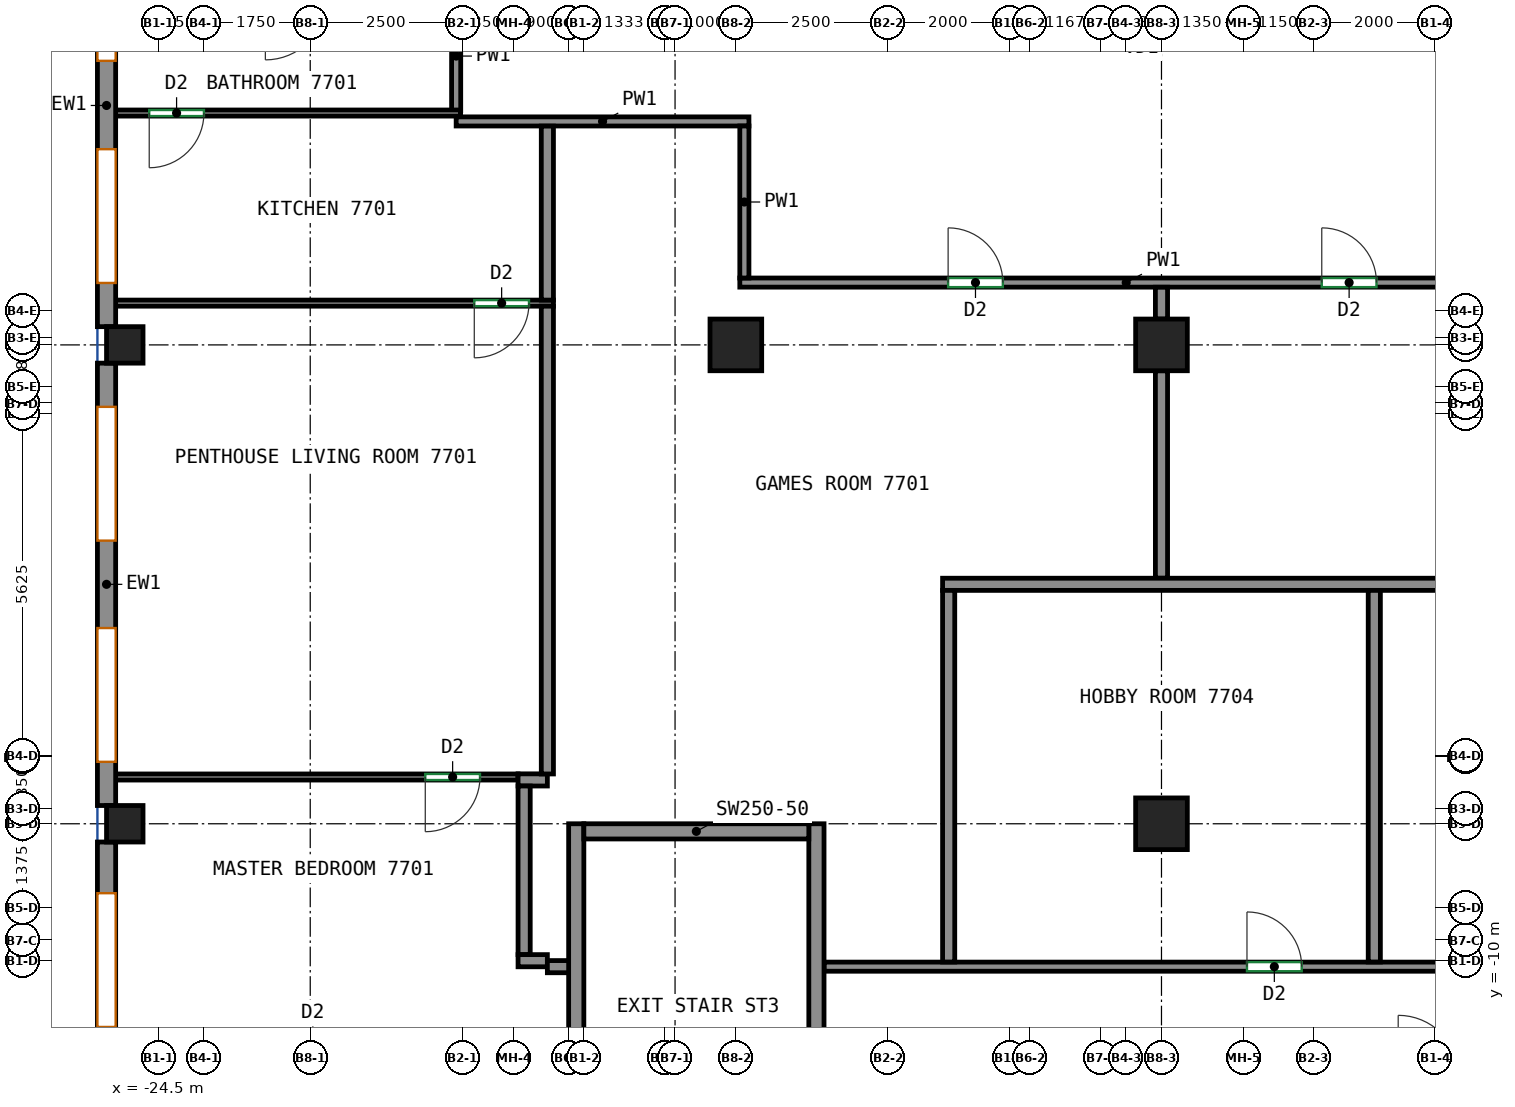
"""IFC4 building model, lengths in metres.
Left out: names, types, materials, properties, quantities, classifications, styles, units other than length and angle.
Written with IfcOpenShell. Run it as: python <this file> out.ifc"""

import sys

from ifc_helpers import new_model, si_unit, direction, frame, frame_2d, origin, origin_2d, place, context, subcontext, project, spatial, rectangle, extrude, source, transform, mapped, element, fill, save


model = new_model("IFC4")
c1 = context("Model", 3, precision=1e-05, world=origin(), true_north=direction((0.0, 1.0)))
c2 = subcontext(c1, "Body", "Model", "MODEL_VIEW")
j1 = project(units=[si_unit("LENGTHUNIT", "METRE"), si_unit("PLANEANGLEUNIT", "RADIAN")], contexts=[c1])
p1 = place(None, origin())
s1 = spatial("IfcSite", under=j1, at=p1, CompositionType="ELEMENT")
p2 = place(p1, origin())
s2 = spatial("IfcBuilding", under=s1, at=p2, CompositionType="ELEMENT")
p3 = place(p2, frame((0.0, 0.0, 308.6)))
s3 = spatial("IfcBuildingStorey", under=s2, at=p3, CompositionType="ELEMENT", Elevation=308.6)
m1 = source(origin(), c2, "Body", "SweptSolid", [
    extrude(rectangle(XDim=0.6, YDim=0.6, at=origin_2d()), origin(), (0.0, 0.0, 1.0), 3.12),
])
for number, where, z_axis, x_axis in (
    (1, (-25.05, -7.75, 0.0), (0.0, 0.0, 1.0), (1.0, 0.0, 0.0)),
    (2, (-25.05, 0.125, 0.0), (0.0, 0.0, 1.0), (1.0, 0.0, 0.0)),
):
    element("IfcColumn", number, at=place(p3, frame(where, z_axis=z_axis, x_axis=x_axis)), inside=s3, PredefinedType="COLUMN", context=c2, shape_type="MappedRepresentation", body=[
        mapped(m1, transform((0.0, 0.0, 0.0))),
    ])
m2 = source(origin(), c2, "Body", "SweptSolid", [
    extrude(rectangle(XDim=0.85, YDim=0.85, at=origin_2d()), origin(), (0.0, 0.0, 1.0), 3.12),
])
for number, where, z_axis, x_axis in (
    (3, (-15.0, 0.125, 0.0), (0.0, 0.0, 1.0), (1.0, 0.0, 0.0)),
    (4, (-8.0, -7.75, 0.0), (0.0, 0.0, 1.0), (1.0, 0.0, 0.0)),
    (5, (-8.0, 0.125, 0.0), (0.0, 0.0, 1.0), (1.0, 0.0, 0.0)),
):
    element("IfcColumn", number, at=place(p3, frame(where, z_axis=z_axis, x_axis=x_axis)), inside=s3, PredefinedType="COLUMN", context=c2, shape_type="MappedRepresentation", body=[
        mapped(m2, transform((0.0, 0.0, 0.0))),
    ])
m3 = source(origin(), c2, "Body", "SweptSolid", [
    extrude(rectangle(XDim=8.0, YDim=0.25, at=frame_2d((4.0, 0.0))), origin(), (0.0, 0.0, 1.0), 3.12),
])
for number, where, z_axis, x_axis in (
    (6, (-17.625, -15.75, 0.0), (0.0, 0.0, 1.0), (0.0, 1.0, 0.0)),
    (7, (-13.675, -15.75, 0.0), (0.0, 0.0, 1.0), (0.0, 1.0, 0.0)),
):
    element("IfcWall", number, at=place(p3, frame(where, z_axis=z_axis, x_axis=x_axis)), inside=s3, PredefinedType="SHEAR", context=c2, shape_type="MappedRepresentation", body=[
        mapped(m3, transform((0.0, 0.0, 0.0))),
    ])
m4 = source(origin(), c2, "Body", "SweptSolid", [
    extrude(rectangle(XDim=3.7, YDim=0.25, at=frame_2d((1.85, 0.0))), origin(), (0.0, 0.0, 1.0), 3.12),
])
p4 = place(p3, frame((-17.5, -7.875, 0.0), z_axis=(0.0, 0.0, 1.0), x_axis=(1.0, 0.0, 0.0)))
e8 = element("IfcWall", 8, at=p4, inside=s3, PredefinedType="SHEAR", context=c2, shape_type="MappedRepresentation", body=[
    mapped(m4, transform((0.0, 0.0, 0.0))),
])
m5 = source(origin(), c2, "Body", "SweptSolid", [
    extrude(rectangle(XDim=7.275, YDim=0.3, at=frame_2d((3.637, 0.0))), origin(), (0.0, 0.0, 1.0), 3.12),
])
p5 = place(p3, frame((-25.35, 7.7, 0.0), z_axis=(0.0, 0.0, 1.0), x_axis=(0.0, -1.0, 0.0)))
e9 = element("IfcWall", 9, at=p5, inside=s3, PredefinedType="SOLIDWALL", context=c2, shape_type="MappedRepresentation", body=[
    mapped(m5, transform((0.0, 0.0, 0.0))),
])
p6 = place(p5, frame((0.728, 0.0, 0.8)))
e10 = element("IfcOpeningElement", 10, at=p6, cuts=e9, PredefinedType="OPENING", context=c2, shape_type="SweptSolid", body=[
    extrude(rectangle(XDim=1.0, YDim=2.05, at=frame_2d((0.5, 1.025))), frame((0.0, 0.16, 0.0), z_axis=(0.0, -1.0, 0.0), x_axis=(1.0, 0.0, 0.0)), (0.0, 0.0, 1.0), 0.32),
])
p7 = place(p5, frame((4.356, 0.0, 0.8)))
e11 = element("IfcOpeningElement", 11, at=p7, cuts=e9, PredefinedType="OPENING", context=c2, shape_type="SweptSolid", body=[
    extrude(rectangle(XDim=2.2, YDim=2.05, at=frame_2d((1.1, 1.025))), frame((0.0, 0.16, 0.0), z_axis=(0.0, -1.0, 0.0), x_axis=(1.0, 0.0, 0.0)), (0.0, 0.0, 1.0), 0.32),
])
p8 = place(p5, frame((2.053, 0.0, 0.8)))
e12 = element("IfcOpeningElement", 12, at=p8, cuts=e9, PredefinedType="OPENING", context=c2, shape_type="SweptSolid", body=[
    extrude(rectangle(XDim=0.85, YDim=2.05, at=frame_2d((0.425, 1.025))), frame((0.0, 0.16, 0.0), z_axis=(0.0, -1.0, 0.0), x_axis=(1.0, 0.0, 0.0)), (0.0, 0.0, 1.0), 0.32),
])
p9 = place(p3, frame((-25.35, -0.175, 0.0), z_axis=(0.0, 0.0, 1.0), x_axis=(0.0, -1.0, 0.0)))
e13 = element("IfcWall", 13, at=p9, inside=s3, PredefinedType="SOLIDWALL", context=c2, shape_type="MappedRepresentation", body=[
    mapped(m5, transform((0.0, 0.0, 0.0))),
])
p10 = place(p9, frame((0.719, 0.0, 0.8)))
e14 = element("IfcOpeningElement", 14, at=p10, cuts=e13, PredefinedType="OPENING", context=c2, shape_type="SweptSolid", body=[
    extrude(rectangle(XDim=2.2, YDim=2.05, at=frame_2d((1.1, 1.025))), frame((0.0, 0.16, 0.0), z_axis=(0.0, -1.0, 0.0), x_axis=(1.0, 0.0, 0.0)), (0.0, 0.0, 1.0), 0.32),
])
p11 = place(p9, frame((4.356, 0.0, 0.8)))
e15 = element("IfcOpeningElement", 15, at=p11, cuts=e13, PredefinedType="OPENING", context=c2, shape_type="SweptSolid", body=[
    extrude(rectangle(XDim=2.2, YDim=2.05, at=frame_2d((1.1, 1.025))), frame((0.0, 0.16, 0.0), z_axis=(0.0, -1.0, 0.0), x_axis=(1.0, 0.0, 0.0)), (0.0, 0.0, 1.0), 0.32),
])
m6 = source(origin(), c2, "Body", "SweptSolid", [
    extrude(rectangle(XDim=11.65, YDim=0.3, at=frame_2d((5.825, 0.0))), origin(), (0.0, 0.0, 1.0), 3.12),
])
p12 = place(p3, frame((-25.35, -8.05, 0.0), z_axis=(0.0, 0.0, 1.0), x_axis=(0.0, -1.0, 0.0)))
e16 = element("IfcWall", 16, at=p12, inside=s3, PredefinedType="SOLIDWALL", context=c2, shape_type="MappedRepresentation", body=[
    mapped(m6, transform((0.0, 0.0, 0.0))),
])
p13 = place(p12, frame((0.842, 0.0, 0.8)))
e17 = element("IfcOpeningElement", 17, at=p13, cuts=e16, PredefinedType="OPENING", context=c2, shape_type="SweptSolid", body=[
    extrude(rectangle(XDim=2.2, YDim=2.05, at=frame_2d((1.1, 1.025))), frame((0.0, 0.16, 0.0), z_axis=(0.0, -1.0, 0.0), x_axis=(1.0, 0.0, 0.0)), (0.0, 0.0, 1.0), 0.32),
])
p14 = place(p12, frame((4.725, 0.0, 0.8)))
e18 = element("IfcOpeningElement", 18, at=p14, cuts=e16, PredefinedType="OPENING", context=c2, shape_type="SweptSolid", body=[
    extrude(rectangle(XDim=2.2, YDim=2.05, at=frame_2d((1.1, 1.025))), frame((0.0, 0.16, 0.0), z_axis=(0.0, -1.0, 0.0), x_axis=(1.0, 0.0, 0.0)), (0.0, 0.0, 1.0), 0.32),
])
p15 = place(p12, frame((8.608, 0.0, 0.8)))
e19 = element("IfcOpeningElement", 19, at=p15, cuts=e16, PredefinedType="OPENING", context=c2, shape_type="SweptSolid", body=[
    extrude(rectangle(XDim=2.2, YDim=2.05, at=frame_2d((1.1, 1.025))), frame((0.0, 0.16, 0.0), z_axis=(0.0, -1.0, 0.0), x_axis=(1.0, 0.0, 0.0)), (0.0, 0.0, 1.0), 0.32),
])
p16 = place(p3, frame((-19.6, 3.8, 0.0), z_axis=(0.0, 0.0, 1.0), x_axis=(1.0, 0.0, 0.0)))
e20 = element("IfcWall", 20, at=p16, inside=s3, PredefinedType="PARTITIONING", context=c2, shape_type="SweptSolid", body=[
    extrude(rectangle(XDim=4.815, YDim=0.15, at=frame_2d((2.408, 0.0))), origin(), (0.0, 0.0, 1.0), 3.12),
])
p17 = place(p3, frame((-19.6, 3.978, 0.0), z_axis=(0.0, 0.0, 1.0), x_axis=(0.0, 1.0, 0.0)))
e21 = element("IfcWall", 21, at=p17, inside=s3, PredefinedType="PARTITIONING", context=c2, shape_type="SweptSolid", body=[
    extrude(rectangle(XDim=1.794, YDim=0.15, at=frame_2d((0.897, 0.0))), origin(), (0.0, 0.0, 1.0), 3.12),
])
p18 = place(p3, frame((-14.935, 1.15, 0.0), z_axis=(0.0, 0.0, 1.0), x_axis=(1.0, 0.0, 0.0)))
e22 = element("IfcWall", 22, at=p18, inside=s3, PredefinedType="PARTITIONING", context=c2, shape_type="SweptSolid", body=[
    extrude(rectangle(XDim=12.71, YDim=0.15, at=frame_2d((6.355, 0.0))), origin(), (0.0, 0.0, 1.0), 3.12),
])
p19 = place(p18, frame((3.426, 0.0, 0.0)))
e23 = element("IfcOpeningElement", 23, at=p19, cuts=e22, PredefinedType="OPENING", context=c2, shape_type="SweptSolid", body=[
    extrude(rectangle(XDim=0.9, YDim=2.1, at=frame_2d((0.45, 1.05))), frame((0.0, 0.085, 0.0), z_axis=(0.0, -1.0, 0.0), x_axis=(1.0, 0.0, 0.0)), (0.0, 0.0, 1.0), 0.17),
])
p20 = place(p18, frame((9.571, 0.0, 0.0)))
e24 = element("IfcOpeningElement", 24, at=p20, cuts=e22, PredefinedType="OPENING", context=c2, shape_type="SweptSolid", body=[
    extrude(rectangle(XDim=0.9, YDim=2.1, at=frame_2d((0.45, 1.05))), frame((0.0, 0.085, 0.0), z_axis=(0.0, -1.0, 0.0), x_axis=(1.0, 0.0, 0.0)), (0.0, 0.0, 1.0), 0.17),
])
p21 = place(p3, frame((-14.86, 3.725, 0.0), z_axis=(0.0, 0.0, 1.0), x_axis=(0.0, -1.0, 0.0)))
e25 = element("IfcWall", 25, at=p21, inside=s3, PredefinedType="PARTITIONING", context=c2, shape_type="SweptSolid", body=[
    extrude(rectangle(XDim=2.5, YDim=0.15, at=frame_2d((1.25, 0.0))), origin(), (0.0, 0.0, 1.0), 3.12),
])
p22 = place(p3, frame((-13.55, -10.1, 0.0), z_axis=(0.0, 0.0, 1.0), x_axis=(1.0, 0.0, 0.0)))
e26 = element("IfcWall", 26, at=p22, inside=s3, PredefinedType="PARTITIONING", context=c2, shape_type="SweptSolid", body=[
    extrude(rectangle(XDim=30.65, YDim=0.15, at=frame_2d((15.325, 0.0))), origin(), (0.0, 0.0, 1.0), 3.12),
])
p23 = place(p22, frame((6.956, 0.0, 0.0)))
e27 = element("IfcOpeningElement", 27, at=p23, cuts=e26, PredefinedType="OPENING", context=c2, shape_type="SweptSolid", body=[
    extrude(rectangle(XDim=0.9, YDim=2.1, at=frame_2d((0.45, 1.05))), frame((0.0, 0.085, 0.0), z_axis=(0.0, -1.0, 0.0), x_axis=(1.0, 0.0, 0.0)), (0.0, 0.0, 1.0), 0.17),
])
p24 = place(p22, frame((10.643, 0.0, 0.0)))
e28 = element("IfcOpeningElement", 28, at=p24, cuts=e26, PredefinedType="OPENING", context=c2, shape_type="SweptSolid", body=[
    extrude(rectangle(XDim=0.9, YDim=2.1, at=frame_2d((0.45, 1.05))), frame((0.0, 0.085, 0.0), z_axis=(0.0, -1.0, 0.0), x_axis=(1.0, 0.0, 0.0)), (0.0, 0.0, 1.0), 0.17),
])
p25 = place(p22, frame((24.155, 0.0, 0.0)))
e29 = element("IfcOpeningElement", 29, at=p25, cuts=e26, PredefinedType="OPENING", context=c2, shape_type="SweptSolid", body=[
    extrude(rectangle(XDim=0.9, YDim=2.1, at=frame_2d((0.45, 1.05))), frame((0.0, 0.085, 0.0), z_axis=(0.0, -1.0, 0.0), x_axis=(1.0, 0.0, 0.0)), (0.0, 0.0, 1.0), 0.17),
])
p26 = place(p3, frame((-18.582, -6.981, 0.0), z_axis=(0.0, 0.0, 1.0), x_axis=(-1.0, 0.0, 0.0)))
e30 = element("IfcWall", 30, at=p26, inside=s3, PredefinedType="PARTITIONING", context=c2, shape_type="SweptSolid", body=[
    extrude(rectangle(XDim=6.668, YDim=0.1, at=frame_2d((3.334, 0.0))), origin(), (0.0, 0.0, 1.0), 3.12),
])
p27 = place(p26, frame((0.626, 0.0, 0.0)))
e31 = element("IfcOpeningElement", 31, at=p27, cuts=e30, PredefinedType="OPENING", context=c2, shape_type="SweptSolid", body=[
    extrude(rectangle(XDim=0.9, YDim=2.1, at=frame_2d((0.45, 1.05))), frame((0.0, 0.06, 0.0), z_axis=(0.0, -1.0, 0.0), x_axis=(1.0, 0.0, 0.0)), (0.0, 0.0, 1.0), 0.12),
])
p28 = place(p3, frame((-18.582, -7.029, 0.0), z_axis=(0.0, 0.0, 1.0), x_axis=(1.0, 0.0, 0.0)))
e32 = element("IfcWall", 32, at=p28, inside=s3, PredefinedType="PARTITIONING", context=c2, shape_type="SweptSolid", body=[
    extrude(rectangle(XDim=0.482, YDim=0.2, at=frame_2d((0.241, 0.0))), origin(), (0.0, 0.0, 1.0), 3.12),
])
p29 = place(p3, frame((-18.482, -9.902, 0.0), z_axis=(0.0, 0.0, 1.0), x_axis=(0.0, 1.0, 0.0)))
e33 = element("IfcWall", 33, at=p29, inside=s3, PredefinedType="PARTITIONING", context=c2, shape_type="SweptSolid", body=[
    extrude(rectangle(XDim=2.773, YDim=0.2, at=frame_2d((1.387, 0.0))), origin(), (0.0, 0.0, 1.0), 3.12),
])
p30 = place(p3, frame((-18.1, -10.002, 0.0), z_axis=(0.0, 0.0, 1.0), x_axis=(-1.0, 0.0, 0.0)))
e34 = element("IfcWall", 34, at=p30, inside=s3, PredefinedType="PARTITIONING", context=c2, shape_type="SweptSolid", body=[
    extrude(rectangle(XDim=0.482, YDim=0.2, at=frame_2d((0.241, 0.0))), origin(), (0.0, 0.0, 1.0), 3.12),
])
p31 = place(p3, frame((-17.7, -10.1, 0.0), z_axis=(0.0, 0.0, 1.0), x_axis=(-1.0, 0.0, 0.0)))
e35 = element("IfcWall", 35, at=p31, inside=s3, PredefinedType="PARTITIONING", context=c2, shape_type="SweptSolid", body=[
    extrude(rectangle(XDim=0.4, YDim=0.2, at=frame_2d((0.2, 0.0))), origin(), (0.0, 0.0, 1.0), 3.12),
])
p32 = place(p3, frame((-18.0, 0.812, 0.0), z_axis=(0.0, 0.0, 1.0), x_axis=(-1.0, 0.0, 0.0)))
e36 = element("IfcWall", 36, at=p32, inside=s3, PredefinedType="PARTITIONING", context=c2, shape_type="SweptSolid", body=[
    extrude(rectangle(XDim=7.25, YDim=0.1, at=frame_2d((3.625, 0.0))), origin(), (0.0, 0.0, 1.0), 3.12),
])
p33 = place(p32, frame((0.402, 0.0, 0.0)))
e37 = element("IfcOpeningElement", 37, at=p33, cuts=e36, PredefinedType="OPENING", context=c2, shape_type="SweptSolid", body=[
    extrude(rectangle(XDim=0.9, YDim=2.1, at=frame_2d((0.45, 1.05))), frame((0.0, 0.06, 0.0), z_axis=(0.0, -1.0, 0.0), x_axis=(1.0, 0.0, 0.0)), (0.0, 0.0, 1.0), 0.12),
])
p34 = place(p3, frame((-18.1, -6.931, 0.0), z_axis=(0.0, 0.0, 1.0), x_axis=(0.0, 1.0, 0.0)))
e38 = element("IfcWall", 38, at=p34, inside=s3, PredefinedType="PARTITIONING", context=c2, shape_type="SweptSolid", body=[
    extrude(rectangle(XDim=7.693, YDim=0.2, at=frame_2d((3.846, 0.0))), origin(), (0.0, 0.0, 1.0), 3.12),
])
p35 = place(p3, frame((-19.527, 3.938, 0.0), z_axis=(0.0, 0.0, 1.0), x_axis=(-1.0, 0.0, 0.0)))
e39 = element("IfcWall", 39, at=p35, inside=s3, PredefinedType="PARTITIONING", context=c2, shape_type="SweptSolid", body=[
    extrude(rectangle(XDim=5.723, YDim=0.1, at=frame_2d((2.861, 0.0))), origin(), (0.0, 0.0, 1.0), 3.12),
])
p36 = place(p35, frame((4.221, 0.0, 0.0)))
e40 = element("IfcOpeningElement", 40, at=p36, cuts=e39, PredefinedType="OPENING", context=c2, shape_type="SweptSolid", body=[
    extrude(rectangle(XDim=0.9, YDim=2.1, at=frame_2d((0.45, 1.05))), frame((0.0, 0.06, 0.0), z_axis=(0.0, -1.0, 0.0), x_axis=(1.0, 0.0, 0.0)), (0.0, 0.0, 1.0), 0.12),
])
p37 = place(p3, frame((-18.1, 0.862, 0.0), z_axis=(0.0, 0.0, 1.0), x_axis=(0.0, 1.0, 0.0)))
e41 = element("IfcWall", 41, at=p37, inside=s3, PredefinedType="PARTITIONING", context=c2, shape_type="SweptSolid", body=[
    extrude(rectangle(XDim=2.861, YDim=0.2, at=frame_2d((1.43, 0.0))), origin(), (0.0, 0.0, 1.0), 3.12),
])
p38 = place(p3, frame((-8.0, 0.55, 0.0), z_axis=(0.0, 0.0, 1.0), x_axis=(0.0, 1.0, 0.0)))
e42 = element("IfcWall", 42, at=p38, inside=s3, PredefinedType="PARTITIONING", context=c2, shape_type="SweptSolid", body=[
    extrude(rectangle(XDim=0.523, YDim=0.2, at=frame_2d((0.261, 0.0))), origin(), (0.0, 0.0, 1.0), 3.12),
])
p39 = place(p3, frame((-8.0, -3.712, 0.0), z_axis=(0.0, 0.0, 1.0), x_axis=(0.0, 1.0, 0.0)))
e43 = element("IfcWall", 43, at=p39, inside=s3, PredefinedType="PARTITIONING", context=c2, shape_type="SweptSolid", body=[
    extrude(rectangle(XDim=3.412, YDim=0.2, at=frame_2d((1.706, 0.0))), origin(), (0.0, 0.0, 1.0), 3.12),
])
p40 = place(p3, frame((-11.6, -3.812, 0.0), z_axis=(0.0, 0.0, 1.0), x_axis=(1.0, 0.0, 0.0)))
e44 = element("IfcWall", 44, at=p40, inside=s3, PredefinedType="PARTITIONING", context=c2, shape_type="SweptSolid", body=[
    extrude(rectangle(XDim=28.2, YDim=0.2, at=frame_2d((14.1, 0.0))), origin(), (0.0, 0.0, 1.0), 3.12),
])
for number, where, z_axis, x_axis in (
    (45, (-11.5, -10.023, 0.0), (0.0, 0.0, 1.0), (0.0, 1.0, 0.0)),
    (46, (-4.5, -10.023, 0.0), (0.0, 0.0, 1.0), (0.0, 1.0, 0.0)),
):
    element("IfcWall", number, at=place(p3, frame(where, z_axis=z_axis, x_axis=x_axis)), inside=s3, PredefinedType="PARTITIONING", context=c2, shape_type="SweptSolid", body=[
        extrude(rectangle(XDim=6.111, YDim=0.2, at=frame_2d((3.055, 0.0))), origin(), (0.0, 0.0, 1.0), 3.12),
    ])
p41 = place(p7, origin())
e47 = element("IfcWindow", 47, at=p41, inside=s3, PartitioningType="SINGLE_PANEL", PredefinedType="WINDOW", context=c2, shape_type="SweptSolid", body=[
    extrude(rectangle(XDim=2.2, YDim=2.05, at=frame_2d((1.1, 1.025))), frame((0.0, 0.03, 0.0), z_axis=(0.0, -1.0, 0.0), x_axis=(1.0, 0.0, 0.0)), (0.0, 0.0, 1.0), 0.06),
])
fill(e11, e47)
p42 = place(p10, origin())
e48 = element("IfcWindow", 48, at=p42, inside=s3, PartitioningType="SINGLE_PANEL", PredefinedType="WINDOW", context=c2, shape_type="SweptSolid", body=[
    extrude(rectangle(XDim=2.2, YDim=2.05, at=frame_2d((1.1, 1.025))), frame((0.0, 0.03, 0.0), z_axis=(0.0, -1.0, 0.0), x_axis=(1.0, 0.0, 0.0)), (0.0, 0.0, 1.0), 0.06),
])
fill(e14, e48)
p43 = place(p11, origin())
e49 = element("IfcWindow", 49, at=p43, inside=s3, PartitioningType="SINGLE_PANEL", PredefinedType="WINDOW", context=c2, shape_type="SweptSolid", body=[
    extrude(rectangle(XDim=2.2, YDim=2.05, at=frame_2d((1.1, 1.025))), frame((0.0, 0.03, 0.0), z_axis=(0.0, -1.0, 0.0), x_axis=(1.0, 0.0, 0.0)), (0.0, 0.0, 1.0), 0.06),
])
fill(e15, e49)
p44 = place(p13, origin())
e50 = element("IfcWindow", 50, at=p44, inside=s3, PartitioningType="SINGLE_PANEL", PredefinedType="WINDOW", context=c2, shape_type="SweptSolid", body=[
    extrude(rectangle(XDim=2.2, YDim=2.05, at=frame_2d((1.1, 1.025))), frame((0.0, 0.03, 0.0), z_axis=(0.0, -1.0, 0.0), x_axis=(1.0, 0.0, 0.0)), (0.0, 0.0, 1.0), 0.06),
])
fill(e17, e50)
p45 = place(p23, origin())
e51 = element("IfcDoor", 51, at=p45, inside=s3, OperationType="SINGLE_SWING_LEFT", PredefinedType="DOOR", context=c2, shape_type="SweptSolid", body=[
    extrude(rectangle(XDim=0.9, YDim=2.1, at=frame_2d((0.45, 1.05))), frame((0.0, 0.025, 0.0), z_axis=(0.0, -1.0, 0.0), x_axis=(1.0, 0.0, 0.0)), (0.0, 0.0, 1.0), 0.05),
])
fill(e27, e51)
p46 = place(p27, origin())
e52 = element("IfcDoor", 52, at=p46, inside=s3, OperationType="SINGLE_SWING_RIGHT", PredefinedType="DOOR", context=c2, shape_type="SweptSolid", body=[
    extrude(rectangle(XDim=0.9, YDim=2.1, at=frame_2d((0.45, 1.05))), frame((0.0, 0.025, 0.0), z_axis=(0.0, -1.0, 0.0), x_axis=(1.0, 0.0, 0.0)), (0.0, 0.0, 1.0), 0.05),
])
fill(e31, e52)
p47 = place(p33, origin())
e53 = element("IfcDoor", 53, at=p47, inside=s3, OperationType="SINGLE_SWING_RIGHT", PredefinedType="DOOR", context=c2, shape_type="SweptSolid", body=[
    extrude(rectangle(XDim=0.9, YDim=2.1, at=frame_2d((0.45, 1.05))), frame((0.0, 0.025, 0.0), z_axis=(0.0, -1.0, 0.0), x_axis=(1.0, 0.0, 0.0)), (0.0, 0.0, 1.0), 0.05),
])
fill(e37, e53)
p48 = place(p19, origin())
e54 = element("IfcDoor", 54, at=p48, inside=s3, OperationType="SINGLE_SWING_LEFT", PredefinedType="DOOR", context=c2, shape_type="SweptSolid", body=[
    extrude(rectangle(XDim=0.9, YDim=2.1, at=frame_2d((0.45, 1.05))), frame((0.0, 0.025, 0.0), z_axis=(0.0, -1.0, 0.0), x_axis=(1.0, 0.0, 0.0)), (0.0, 0.0, 1.0), 0.05),
])
fill(e23, e54)
p49 = place(p20, origin())
e55 = element("IfcDoor", 55, at=p49, inside=s3, OperationType="SINGLE_SWING_LEFT", PredefinedType="DOOR", context=c2, shape_type="SweptSolid", body=[
    extrude(rectangle(XDim=0.9, YDim=2.1, at=frame_2d((0.45, 1.05))), frame((0.0, 0.025, 0.0), z_axis=(0.0, -1.0, 0.0), x_axis=(1.0, 0.0, 0.0)), (0.0, 0.0, 1.0), 0.05),
])
fill(e24, e55)
p50 = place(p36, origin())
e56 = element("IfcDoor", 56, at=p50, inside=s3, OperationType="SINGLE_SWING_RIGHT", PredefinedType="DOOR", context=c2, shape_type="SweptSolid", body=[
    extrude(rectangle(XDim=0.9, YDim=2.1, at=frame_2d((0.45, 1.05))), frame((0.0, 0.025, 0.0), z_axis=(0.0, -1.0, 0.0), x_axis=(1.0, 0.0, 0.0)), (0.0, 0.0, 1.0), 0.05),
])
fill(e40, e56)
p51 = place(p8, origin())
e57 = element("IfcWindow", 57, at=p51, inside=s3, PartitioningType="SINGLE_PANEL", PredefinedType="WINDOW", context=c2, shape_type="SweptSolid", body=[
    extrude(rectangle(XDim=0.85, YDim=2.05, at=frame_2d((0.425, 1.025))), frame((0.0, 0.03, 0.0), z_axis=(0.0, -1.0, 0.0), x_axis=(1.0, 0.0, 0.0)), (0.0, 0.0, 1.0), 0.06),
])
fill(e12, e57)
save(model, sys.argv[1])
